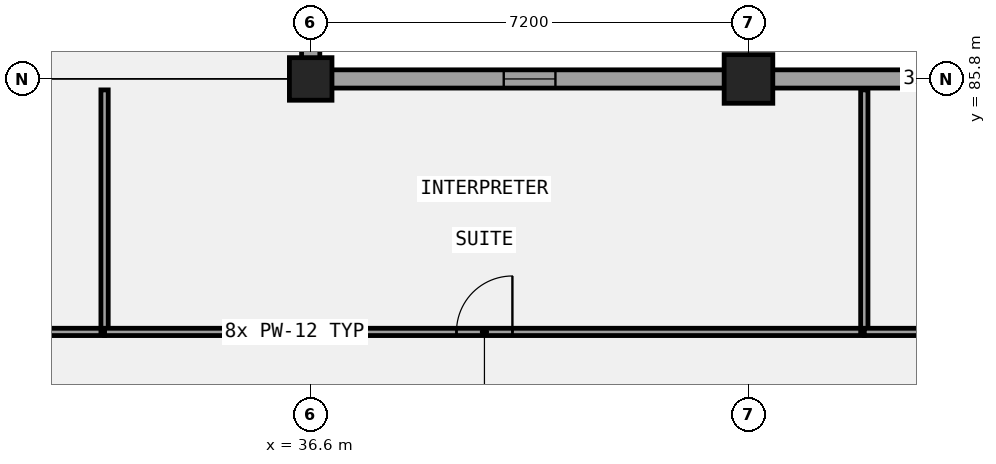
"""IFC4 building model, lengths in metres.
Left out: names, types, materials, properties, quantities, classifications, styles, units other than length and angle.
Written with IfcOpenShell. Run it as: python <this file> out.ifc"""

import sys

from ifc_helpers import new_model, si_unit, direction, frame, frame_2d, origin, origin_2d, place, context, subcontext, project, spatial, rectangle, extrude, element, fill, save


model = new_model("IFC4")
c1 = context("Model", 3, precision=1e-05, world=origin(), true_north=direction((0.0, 1.0)))
c2 = subcontext(c1, "Body", "Model", "MODEL_VIEW")
j1 = project(units=[si_unit("LENGTHUNIT", "METRE"), si_unit("PLANEANGLEUNIT", "RADIAN")], contexts=[c1])
p1 = place(None, origin())
s1 = spatial("IfcSite", under=j1, at=p1, CompositionType="ELEMENT")
p2 = place(p1, origin())
s2 = spatial("IfcBuilding", under=s1, at=p2, CompositionType="ELEMENT")
p3 = place(p2, frame((0.0, 0.0, 5.4)))
s3 = spatial("IfcBuildingStorey", under=s2, at=p3, CompositionType="ELEMENT", Elevation=5.4)
p4 = place(p3, frame((36.6, 85.8, 0.0), z_axis=(0.0, 0.0, 1.0), x_axis=(1.0, 0.0, 0.0)))
e1 = element("IfcColumn", 1, at=p4, inside=s3, PredefinedType="COLUMN", context=c2, shape_type="SweptSolid", body=[
    extrude(rectangle(XDim=0.7, YDim=0.7, at=origin_2d()), origin(), (0.0, 0.0, 1.0), 4.2),
])
p5 = place(p3, frame((43.8, 85.8, 0.0), z_axis=(0.0, 0.0, 1.0), x_axis=(1.0, 0.0, 0.0)))
e2 = element("IfcColumn", 2, at=p5, inside=s3, PredefinedType="COLUMN", context=c2, shape_type="SweptSolid", body=[
    extrude(rectangle(XDim=0.8, YDim=0.8, at=origin_2d()), origin(), (0.0, 0.0, 1.0), 4.2),
])
p6 = place(p3, frame((108.75, 85.8, 0.0), z_axis=(0.0, 0.0, 1.0), x_axis=(-1.0, 0.0, 0.0)))
e3 = element("IfcWall", 3, at=p6, inside=s3, PredefinedType="SOLIDWALL", context=c2, shape_type="SweptSolid", body=[
    extrude(rectangle(XDim=72.3, YDim=0.3, at=frame_2d((36.15, 0.0))), origin(), (0.0, 0.0, 1.0), 2.92),
])
p7 = place(p6, frame((68.125, 0.0, 1.0)))
e4 = element("IfcOpeningElement", 4, at=p7, cuts=e3, PredefinedType="OPENING", context=c2, shape_type="SweptSolid", body=[
    extrude(rectangle(XDim=0.85, YDim=1.4, at=frame_2d((0.425, 0.7))), frame((0.0, 0.16, 0.0), z_axis=(0.0, -1.0, 0.0), x_axis=(1.0, 0.0, 0.0)), (0.0, 0.0, 1.0), 0.32),
])
p8 = place(p6, frame((60.925, 0.0, 1.0)))
e5 = element("IfcOpeningElement", 5, at=p8, cuts=e3, PredefinedType="OPENING", context=c2, shape_type="SweptSolid", body=[
    extrude(rectangle(XDim=0.85, YDim=1.4, at=frame_2d((0.425, 0.7))), frame((0.0, 0.16, 0.0), z_axis=(0.0, -1.0, 0.0), x_axis=(1.0, 0.0, 0.0)), (0.0, 0.0, 1.0), 0.32),
])
p9 = place(p6, frame((53.725, 0.0, 1.0)))
e6 = element("IfcOpeningElement", 6, at=p9, cuts=e3, PredefinedType="OPENING", context=c2, shape_type="SweptSolid", body=[
    extrude(rectangle(XDim=0.85, YDim=1.4, at=frame_2d((0.425, 0.7))), frame((0.0, 0.16, 0.0), z_axis=(0.0, -1.0, 0.0), x_axis=(1.0, 0.0, 0.0)), (0.0, 0.0, 1.0), 0.32),
])
p10 = place(p6, frame((46.525, 0.0, 1.0)))
e7 = element("IfcOpeningElement", 7, at=p10, cuts=e3, PredefinedType="OPENING", context=c2, shape_type="SweptSolid", body=[
    extrude(rectangle(XDim=0.85, YDim=1.4, at=frame_2d((0.425, 0.7))), frame((0.0, 0.16, 0.0), z_axis=(0.0, -1.0, 0.0), x_axis=(1.0, 0.0, 0.0)), (0.0, 0.0, 1.0), 0.32),
])
p11 = place(p6, frame((39.325, 0.0, 1.0)))
e8 = element("IfcOpeningElement", 8, at=p11, cuts=e3, PredefinedType="OPENING", context=c2, shape_type="SweptSolid", body=[
    extrude(rectangle(XDim=0.85, YDim=1.4, at=frame_2d((0.425, 0.7))), frame((0.0, 0.16, 0.0), z_axis=(0.0, -1.0, 0.0), x_axis=(1.0, 0.0, 0.0)), (0.0, 0.0, 1.0), 0.32),
])
p12 = place(p6, frame((32.125, 0.0, 1.0)))
e9 = element("IfcOpeningElement", 9, at=p12, cuts=e3, PredefinedType="OPENING", context=c2, shape_type="SweptSolid", body=[
    extrude(rectangle(XDim=0.85, YDim=1.4, at=frame_2d((0.425, 0.7))), frame((0.0, 0.16, 0.0), z_axis=(0.0, -1.0, 0.0), x_axis=(1.0, 0.0, 0.0)), (0.0, 0.0, 1.0), 0.32),
])
p13 = place(p6, frame((24.925, 0.0, 1.0)))
e10 = element("IfcOpeningElement", 10, at=p13, cuts=e3, PredefinedType="OPENING", context=c2, shape_type="SweptSolid", body=[
    extrude(rectangle(XDim=0.85, YDim=1.4, at=frame_2d((0.425, 0.7))), frame((0.0, 0.16, 0.0), z_axis=(0.0, -1.0, 0.0), x_axis=(1.0, 0.0, 0.0)), (0.0, 0.0, 1.0), 0.32),
])
p14 = place(p6, frame((17.725, 0.0, 1.0)))
e11 = element("IfcOpeningElement", 11, at=p14, cuts=e3, PredefinedType="OPENING", context=c2, shape_type="SweptSolid", body=[
    extrude(rectangle(XDim=0.85, YDim=1.4, at=frame_2d((0.425, 0.7))), frame((0.0, 0.16, 0.0), z_axis=(0.0, -1.0, 0.0), x_axis=(1.0, 0.0, 0.0)), (0.0, 0.0, 1.0), 0.32),
])
p15 = place(p6, frame((10.525, 0.0, 1.0)))
e12 = element("IfcOpeningElement", 12, at=p15, cuts=e3, PredefinedType="OPENING", context=c2, shape_type="SweptSolid", body=[
    extrude(rectangle(XDim=0.85, YDim=1.4, at=frame_2d((0.425, 0.7))), frame((0.0, 0.16, 0.0), z_axis=(0.0, -1.0, 0.0), x_axis=(1.0, 0.0, 0.0)), (0.0, 0.0, 1.0), 0.32),
])
p16 = place(p6, frame((3.325, 0.0, 1.0)))
e13 = element("IfcOpeningElement", 13, at=p16, cuts=e3, PredefinedType="OPENING", context=c2, shape_type="SweptSolid", body=[
    extrude(rectangle(XDim=0.85, YDim=1.4, at=frame_2d((0.425, 0.7))), frame((0.0, 0.16, 0.0), z_axis=(0.0, -1.0, 0.0), x_axis=(1.0, 0.0, 0.0)), (0.0, 0.0, 1.0), 0.32),
])
p17 = place(p3, frame((36.6, 85.95, 0.0), z_axis=(0.0, 0.0, 1.0), x_axis=(0.0, 1.0, 0.0)))
e14 = element("IfcWall", 14, at=p17, inside=s3, PredefinedType="SOLIDWALL", context=c2, shape_type="SweptSolid", body=[
    extrude(rectangle(XDim=21.3, YDim=0.3, at=frame_2d((10.65, 0.0))), origin(), (0.0, 0.0, 1.0), 3.02),
])
p18 = place(p17, frame((3.1, 0.0, 1.0)))
e15 = element("IfcOpeningElement", 15, at=p18, cuts=e14, PredefinedType="OPENING", context=c2, shape_type="SweptSolid", body=[
    extrude(rectangle(XDim=0.85, YDim=1.65, at=frame_2d((0.425, 0.825))), frame((0.0, 0.16, 0.0), z_axis=(0.0, -1.0, 0.0), x_axis=(1.0, 0.0, 0.0)), (0.0, 0.0, 1.0), 0.32),
])
p19 = place(p17, frame((10.225, 0.0, 1.0)))
e16 = element("IfcOpeningElement", 16, at=p19, cuts=e14, PredefinedType="OPENING", context=c2, shape_type="SweptSolid", body=[
    extrude(rectangle(XDim=0.85, YDim=1.65, at=frame_2d((0.425, 0.825))), frame((0.0, 0.16, 0.0), z_axis=(0.0, -1.0, 0.0), x_axis=(1.0, 0.0, 0.0)), (0.0, 0.0, 1.0), 0.32),
])
p20 = place(p17, frame((17.35, 0.0, 1.0)))
e17 = element("IfcOpeningElement", 17, at=p20, cuts=e14, PredefinedType="OPENING", context=c2, shape_type="SweptSolid", body=[
    extrude(rectangle(XDim=0.85, YDim=1.65, at=frame_2d((0.425, 0.825))), frame((0.0, 0.16, 0.0), z_axis=(0.0, -1.0, 0.0), x_axis=(1.0, 0.0, 0.0)), (0.0, 0.0, 1.0), 0.32),
])
p21 = place(p3, frame((20.715, 81.64, 0.0), z_axis=(0.0, 0.0, 1.0), x_axis=(1.0, 0.0, 0.0)))
e18 = element("IfcWall", 18, at=p21, inside=s3, PredefinedType="PARTITIONING", context=c2, shape_type="SweptSolid", body=[
    extrude(rectangle(XDim=12.495, YDim=0.12, at=frame_2d((6.248, 0.0))), origin(), (0.0, 0.0, 1.0), 3.92),
])
p22 = place(p21, frame((5.788, 0.0, 0.0)))
e19 = element("IfcOpeningElement", 19, at=p22, cuts=e18, PredefinedType="OPENING", context=c2, shape_type="SweptSolid", body=[
    extrude(rectangle(XDim=0.92, YDim=2.22, at=frame_2d((0.46, 1.11))), frame((0.0, 0.07, 0.0), z_axis=(0.0, -1.0, 0.0), x_axis=(1.0, 0.0, 0.0)), (0.0, 0.0, 1.0), 0.14),
])
p23 = place(p3, frame((33.21, 81.64, 0.0), z_axis=(0.0, 0.0, 1.0), x_axis=(0.0, 1.0, 0.0)))
e20 = element("IfcWall", 20, at=p23, inside=s3, PredefinedType="PARTITIONING", context=c2, shape_type="SweptSolid", body=[
    extrude(rectangle(XDim=3.98, YDim=0.12, at=frame_2d((1.99, 0.0))), origin(), (0.0, 0.0, 1.0), 3.92),
])
p24 = place(p3, frame((33.21, 81.64, 0.0), z_axis=(0.0, 0.0, 1.0), x_axis=(1.0, 0.0, 0.0)))
e21 = element("IfcWall", 21, at=p24, inside=s3, PredefinedType="PARTITIONING", context=c2, shape_type="SweptSolid", body=[
    extrude(rectangle(XDim=12.495, YDim=0.12, at=frame_2d((6.248, 0.0))), origin(), (0.0, 0.0, 1.0), 3.92),
])
p25 = place(p24, frame((5.788, 0.0, 0.0)))
e22 = element("IfcOpeningElement", 22, at=p25, cuts=e21, PredefinedType="OPENING", context=c2, shape_type="SweptSolid", body=[
    extrude(rectangle(XDim=0.92, YDim=2.35, at=frame_2d((0.46, 1.175))), frame((0.0, 0.07, 0.0), z_axis=(0.0, -1.0, 0.0), x_axis=(1.0, 0.0, 0.0)), (0.0, 0.0, 1.0), 0.14),
])
p26 = place(p3, frame((45.705, 81.64, 0.0), z_axis=(0.0, 0.0, 1.0), x_axis=(0.0, 1.0, 0.0)))
e23 = element("IfcWall", 23, at=p26, inside=s3, PredefinedType="PARTITIONING", context=c2, shape_type="SweptSolid", body=[
    extrude(rectangle(XDim=3.98, YDim=0.12, at=frame_2d((1.99, 0.0))), origin(), (0.0, 0.0, 1.0), 3.92),
])
p27 = place(p3, frame((45.705, 81.64, 0.0), z_axis=(0.0, 0.0, 1.0), x_axis=(1.0, 0.0, 0.0)))
e24 = element("IfcWall", 24, at=p27, inside=s3, PredefinedType="PARTITIONING", context=c2, shape_type="SweptSolid", body=[
    extrude(rectangle(XDim=12.495, YDim=0.12, at=frame_2d((6.248, 0.0))), origin(), (0.0, 0.0, 1.0), 3.92),
])
p28 = place(p27, frame((5.758, 0.0, 0.0)))
e25 = element("IfcOpeningElement", 25, at=p28, cuts=e24, PredefinedType="OPENING", context=c2, shape_type="SweptSolid", body=[
    extrude(rectangle(XDim=0.98, YDim=2.1, at=frame_2d((0.49, 1.05))), frame((0.0, 0.07, 0.0), z_axis=(0.0, -1.0, 0.0), x_axis=(1.0, 0.0, 0.0)), (0.0, 0.0, 1.0), 0.14),
])
p29 = place(p7, origin())
e26 = element("IfcWindow", 26, at=p29, inside=s3, PartitioningType="SINGLE_PANEL", PredefinedType="WINDOW", context=c2, shape_type="SweptSolid", body=[
    extrude(rectangle(XDim=0.85, YDim=1.4, at=frame_2d((0.425, 0.7))), frame((0.0, 0.03, 0.0), z_axis=(0.0, -1.0, 0.0), x_axis=(1.0, 0.0, 0.0)), (0.0, 0.0, 1.0), 0.06),
])
fill(e4, e26)
p30 = place(p25, origin())
e27 = element("IfcDoor", 27, at=p30, inside=s3, OperationType="SINGLE_SWING_RIGHT", PredefinedType="DOOR", context=c2, shape_type="SweptSolid", body=[
    extrude(rectangle(XDim=0.92, YDim=2.35, at=frame_2d((0.46, 1.175))), frame((0.0, 0.025, 0.0), z_axis=(0.0, -1.0, 0.0), x_axis=(1.0, 0.0, 0.0)), (0.0, 0.0, 1.0), 0.05),
])
fill(e22, e27)
save(model, sys.argv[1])
